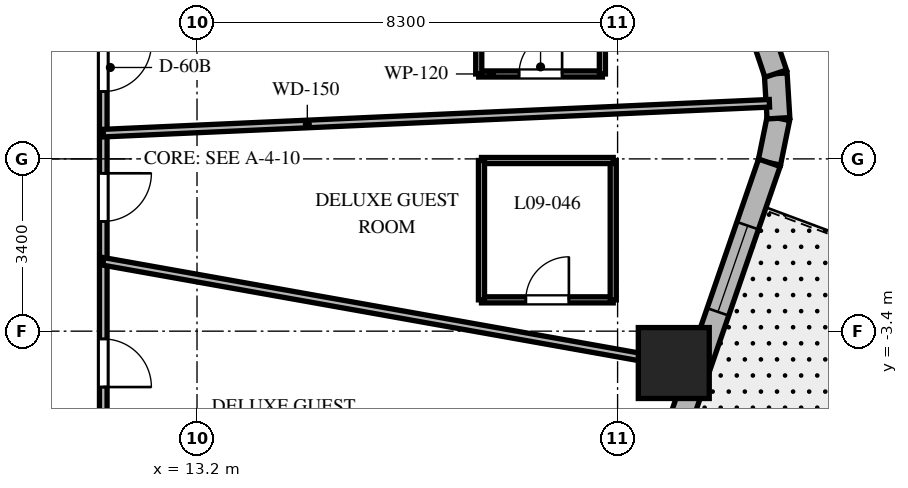
"""IFC4 building model, lengths in metres.
Left out: names, types, materials, properties, quantities, classifications, styles, units other than length and angle.
Written with IfcOpenShell. Run it as: python <this file> out.ifc"""

import sys

from ifc_helpers import new_model, si_unit, direction, frame, frame_2d, origin, origin_2d, place, context, subcontext, project, spatial, rectangle, extrude, element, fill, save


model = new_model("IFC4")
c1 = context("Model", 3, precision=1e-05, world=origin(), true_north=direction((0.0, 1.0)))
c2 = subcontext(c1, "Body", "Model", "MODEL_VIEW")
j1 = project(units=[si_unit("LENGTHUNIT", "METRE"), si_unit("PLANEANGLEUNIT", "RADIAN")], contexts=[c1])
p1 = place(None, origin())
s1 = spatial("IfcSite", under=j1, at=p1, CompositionType="ELEMENT")
p2 = place(p1, origin())
s2 = spatial("IfcBuilding", under=s1, at=p2, CompositionType="ELEMENT")
p3 = place(p2, frame((0.0, 0.0, 45.3)))
s3 = spatial("IfcBuildingStorey", under=s2, at=p3, CompositionType="ELEMENT", Elevation=45.3)
p4 = place(p3, frame((22.609, -4.029, 0.0), z_axis=(0.0, 0.0, 1.0), x_axis=(1.0, 0.0, 0.0)))
e1 = element("IfcColumn", 1, at=p4, inside=s3, PredefinedType="COLUMN", context=c2, shape_type="SweptSolid", body=[
    extrude(rectangle(XDim=1.4, YDim=1.4, at=origin_2d()), origin(), (0.0, 0.0, 1.0), 3.7),
])
p5 = place(p3, frame((24.496, -0.077, 0.0), z_axis=(0.0, 0.0, 1.0), x_axis=(0.199570594521, 0.979883451132, 0.0)))
e2 = element("IfcWall", 2, at=p5, inside=s3, PredefinedType="SOLIDWALL", context=c2, shape_type="SweptSolid", body=[
    extrude(rectangle(XDim=0.897, YDim=0.45, at=frame_2d((0.448, 0.0))), origin(), (0.0, 0.0, 1.0), 3.4),
])
p6 = place(p3, frame((24.675, 0.802, 0.0), z_axis=(0.0, 0.0, 1.0), x_axis=(-0.061188874166, 0.998126205286, 0.0)))
e3 = element("IfcWall", 3, at=p6, inside=s3, PredefinedType="SOLIDWALL", context=c2, shape_type="SweptSolid", body=[
    extrude(rectangle(XDim=0.882, YDim=0.45, at=frame_2d((0.441, 0.0))), origin(), (0.0, 0.0, 1.0), 3.4),
])
p7 = place(p3, frame((24.621, 1.682, 0.0), z_axis=(0.0, 0.0, 1.0), x_axis=(-0.317697451681, 0.948192137278, 0.0)))
e4 = element("IfcWall", 4, at=p7, inside=s3, PredefinedType="SOLIDWALL", context=c2, shape_type="SweptSolid", body=[
    extrude(rectangle(XDim=0.897, YDim=0.45, at=frame_2d((0.448, 0.0))), origin(), (0.0, 0.0, 1.0), 3.4),
])
p8 = place(p3, frame((17.39, -20.678, 0.0), z_axis=(0.0, 0.0, 1.0), x_axis=(0.326068018294, 0.945346310854, 0.0)))
e5 = element("IfcWall", 5, at=p8, inside=s3, PredefinedType="SOLIDWALL", context=c2, shape_type="SweptSolid", body=[
    extrude(rectangle(XDim=21.793, YDim=0.45, at=frame_2d((10.896, 0.0))), origin(), (0.0, 0.0, 1.0), 3.4),
])
p9 = place(p8, frame((5.493, 0.0, 0.0)))
e6 = element("IfcOpeningElement", 6, at=p9, cuts=e5, PredefinedType="OPENING", context=c2, shape_type="SweptSolid", body=[
    extrude(rectangle(XDim=0.95, YDim=2.15, at=frame_2d((0.475, 1.075))), frame((0.0, 0.235, 0.0), z_axis=(0.0, -1.0, 0.0), x_axis=(1.0, 0.0, 0.0)), (0.0, 0.0, 1.0), 0.47),
])
p10 = place(p8, frame((1.26, 0.0, 0.8)))
e7 = element("IfcOpeningElement", 7, at=p10, cuts=e5, PredefinedType="OPENING", context=c2, shape_type="SweptSolid", body=[
    extrude(rectangle(XDim=1.8, YDim=1.8, at=frame_2d((0.9, 0.9))), frame((0.0, 0.235, 0.0), z_axis=(0.0, -1.0, 0.0), x_axis=(1.0, 0.0, 0.0)), (0.0, 0.0, 1.0), 0.47),
])
p11 = place(p8, frame((7.283, 0.0, 0.8)))
e8 = element("IfcOpeningElement", 8, at=p11, cuts=e5, PredefinedType="OPENING", context=c2, shape_type="SweptSolid", body=[
    extrude(rectangle(XDim=1.8, YDim=1.8, at=frame_2d((0.9, 0.9))), frame((0.0, 0.235, 0.0), z_axis=(0.0, -1.0, 0.0), x_axis=(1.0, 0.0, 0.0)), (0.0, 0.0, 1.0), 0.47),
])
p12 = place(p8, frame((12.736, 0.0, 0.8)))
e9 = element("IfcOpeningElement", 9, at=p12, cuts=e5, PredefinedType="OPENING", context=c2, shape_type="SweptSolid", body=[
    extrude(rectangle(XDim=1.8, YDim=1.8, at=frame_2d((0.9, 0.9))), frame((0.0, 0.235, 0.0), z_axis=(0.0, -1.0, 0.0), x_axis=(1.0, 0.0, 0.0)), (0.0, 0.0, 1.0), 0.47),
])
p13 = place(p8, frame((18.68, 0.0, 0.8)))
e10 = element("IfcOpeningElement", 10, at=p13, cuts=e5, PredefinedType="OPENING", context=c2, shape_type="SweptSolid", body=[
    extrude(rectangle(XDim=1.8, YDim=1.8, at=frame_2d((0.9, 0.9))), frame((0.0, 0.235, 0.0), z_axis=(0.0, -1.0, 0.0), x_axis=(1.0, 0.0, 0.0)), (0.0, 0.0, 1.0), 0.47),
])
p14 = place(p3, frame((11.35, 9.85, 0.0), z_axis=(0.0, 0.0, 1.0), x_axis=(0.0, -1.0, 0.0)))
e11 = element("IfcWall", 11, at=p14, inside=s3, PredefinedType="PARTITIONING", context=c2, shape_type="SweptSolid", body=[
    extrude(rectangle(XDim=19.7, YDim=0.15, at=frame_2d((9.85, 0.0))), origin(), (0.0, 0.0, 1.0), 2.84),
])
p15 = place(p14, frame((7.571, 0.0, 0.0)))
e12 = element("IfcOpeningElement", 12, at=p15, cuts=e11, PredefinedType="OPENING", context=c2, shape_type="SweptSolid", body=[
    extrude(rectangle(XDim=0.95, YDim=2.03, at=frame_2d((0.475, 1.015))), frame((0.0, 0.085, 0.0), z_axis=(0.0, -1.0, 0.0), x_axis=(1.0, 0.0, 0.0)), (0.0, 0.0, 1.0), 0.17),
])
p16 = place(p14, frame((3.024, 0.0, 0.0)))
e13 = element("IfcOpeningElement", 13, at=p16, cuts=e11, PredefinedType="OPENING", context=c2, shape_type="SweptSolid", body=[
    extrude(rectangle(XDim=0.95, YDim=2.03, at=frame_2d((0.475, 1.015))), frame((0.0, 0.085, 0.0), z_axis=(0.0, -1.0, 0.0), x_axis=(1.0, 0.0, 0.0)), (0.0, 0.0, 1.0), 0.17),
])
p17 = place(p14, frame((17.181, 0.0, 0.0)))
e14 = element("IfcOpeningElement", 14, at=p17, cuts=e11, PredefinedType="OPENING", context=c2, shape_type="SweptSolid", body=[
    extrude(rectangle(XDim=0.95, YDim=2.03, at=frame_2d((0.475, 1.015))), frame((0.0, 0.085, 0.0), z_axis=(0.0, -1.0, 0.0), x_axis=(1.0, 0.0, 0.0)), (0.0, 0.0, 1.0), 0.17),
])
p18 = place(p14, frame((13.403, 0.0, 0.0)))
e15 = element("IfcOpeningElement", 15, at=p18, cuts=e11, PredefinedType="OPENING", context=c2, shape_type="SweptSolid", body=[
    extrude(rectangle(XDim=0.95, YDim=2.03, at=frame_2d((0.475, 1.015))), frame((0.0, 0.085, 0.0), z_axis=(0.0, -1.0, 0.0), x_axis=(1.0, 0.0, 0.0)), (0.0, 0.0, 1.0), 0.17),
])
p19 = place(p14, frame((10.134, 0.0, 0.0)))
e16 = element("IfcOpeningElement", 16, at=p19, cuts=e11, PredefinedType="OPENING", context=c2, shape_type="SweptSolid", body=[
    extrude(rectangle(XDim=0.95, YDim=2.03, at=frame_2d((0.475, 1.015))), frame((0.0, 0.085, 0.0), z_axis=(0.0, -1.0, 0.0), x_axis=(1.0, 0.0, 0.0)), (0.0, 0.0, 1.0), 0.17),
])
p20 = place(p3, frame((11.35, 0.508, 0.0), z_axis=(0.0, 0.0, 1.0), x_axis=(0.998998237556, 0.044749540337, 0.0)))
e17 = element("IfcWall", 17, at=p20, inside=s3, PredefinedType="PARTITIONING", context=c2, shape_type="SweptSolid", body=[
    extrude(rectangle(XDim=13.159, YDim=0.15, at=frame_2d((6.58, 0.0))), origin(), (0.0, 0.0, 1.0), 2.54),
])
p21 = place(p3, frame((11.35, -2.023, 0.0), z_axis=(0.0, 0.0, 1.0), x_axis=(0.984493741877, -0.17541970301, 0.0)))
e18 = element("IfcWall", 18, at=p21, inside=s3, PredefinedType="PARTITIONING", context=c2, shape_type="SweptSolid", body=[
    extrude(rectangle(XDim=11.937, YDim=0.15, at=frame_2d((5.969, 0.0))), origin(), (0.0, 0.0, 1.0), 2.54),
])
p22 = place(p3, frame((18.76, 1.676, 0.0), z_axis=(0.0, 0.0, 1.0), x_axis=(1.0, 0.0, 0.0)))
e19 = element("IfcWall", 19, at=p22, inside=s3, PredefinedType="PARTITIONING", context=c2, shape_type="SweptSolid", body=[
    extrude(rectangle(XDim=2.44, YDim=0.12, at=frame_2d((1.22, 0.0))), origin(), (0.0, 0.0, 1.0), 3.4),
])
p23 = place(p22, frame((0.795, 0.0, 0.0)))
e20 = element("IfcOpeningElement", 20, at=p23, cuts=e19, PredefinedType="OPENING", context=c2, shape_type="SweptSolid", body=[
    extrude(rectangle(XDim=0.85, YDim=2.03, at=frame_2d((0.425, 1.015))), frame((0.0, 0.07, 0.0), z_axis=(0.0, -1.0, 0.0), x_axis=(1.0, 0.0, 0.0)), (0.0, 0.0, 1.0), 0.14),
])
for number, where, z_axis, x_axis in (
    (21, (21.2, 1.676, 0.0), (0.0, 0.0, 1.0), (0.0, 1.0, 0.0)),
    (22, (18.76, 4.286, 0.0), (0.0, 0.0, 1.0), (0.0, -1.0, 0.0)),
):
    element("IfcWall", number, at=place(p3, frame(where, z_axis=z_axis, x_axis=x_axis)), inside=s3, PredefinedType="PARTITIONING", context=c2, shape_type="SweptSolid", body=[
        extrude(rectangle(XDim=2.61, YDim=0.12, at=frame_2d((1.305, 0.0))), origin(), (0.0, 0.0, 1.0), 3.4),
    ])
p24 = place(p3, frame((18.814, -2.782, 0.0), z_axis=(0.0, 0.0, 1.0), x_axis=(1.0, 0.0, 0.0)))
e23 = element("IfcWall", 23, at=p24, inside=s3, PredefinedType="PARTITIONING", context=c2, shape_type="SweptSolid", body=[
    extrude(rectangle(XDim=2.6, YDim=0.12, at=frame_2d((1.3, 0.0))), origin(), (0.0, 0.0, 1.0), 3.4),
])
p25 = place(p24, frame((0.875, 0.0, 0.0)))
e24 = element("IfcOpeningElement", 24, at=p25, cuts=e23, PredefinedType="OPENING", context=c2, shape_type="SweptSolid", body=[
    extrude(rectangle(XDim=0.85, YDim=2.03, at=frame_2d((0.425, 1.015))), frame((0.0, 0.07, 0.0), z_axis=(0.0, -1.0, 0.0), x_axis=(1.0, 0.0, 0.0)), (0.0, 0.0, 1.0), 0.14),
])
p26 = place(p3, frame((21.414, -2.782, 0.0), z_axis=(0.0, 0.0, 1.0), x_axis=(0.0, 1.0, 0.0)))
e25 = element("IfcWall", 25, at=p26, inside=s3, PredefinedType="PARTITIONING", context=c2, shape_type="SweptSolid", body=[
    extrude(rectangle(XDim=2.75, YDim=0.12, at=frame_2d((1.375, 0.0))), origin(), (0.0, 0.0, 1.0), 3.4),
])
p27 = place(p3, frame((21.414, -0.032, 0.0), z_axis=(0.0, 0.0, 1.0), x_axis=(-1.0, 0.0, 0.0)))
e26 = element("IfcWall", 26, at=p27, inside=s3, PredefinedType="PARTITIONING", context=c2, shape_type="SweptSolid", body=[
    extrude(rectangle(XDim=2.6, YDim=0.12, at=frame_2d((1.3, 0.0))), origin(), (0.0, 0.0, 1.0), 3.4),
])
p28 = place(p3, frame((18.814, -0.032, 0.0), z_axis=(0.0, 0.0, 1.0), x_axis=(0.0, -1.0, 0.0)))
e27 = element("IfcWall", 27, at=p28, inside=s3, PredefinedType="PARTITIONING", context=c2, shape_type="SweptSolid", body=[
    extrude(rectangle(XDim=2.75, YDim=0.12, at=frame_2d((1.375, 0.0))), origin(), (0.0, 0.0, 1.0), 3.4),
])
p29 = place(p13, origin())
e28 = element("IfcWindow", 28, at=p29, inside=s3, PartitioningType="SINGLE_PANEL", PredefinedType="WINDOW", context=c2, shape_type="SweptSolid", body=[
    extrude(rectangle(XDim=1.8, YDim=1.8, at=frame_2d((0.9, 0.9))), frame((0.0, 0.03, 0.0), z_axis=(0.0, -1.0, 0.0), x_axis=(1.0, 0.0, 0.0)), (0.0, 0.0, 1.0), 0.06),
])
fill(e10, e28)
p30 = place(p15, origin())
e29 = element("IfcDoor", 29, at=p30, inside=s3, OperationType="SINGLE_SWING_LEFT", PredefinedType="DOOR", context=c2, shape_type="SweptSolid", body=[
    extrude(rectangle(XDim=0.95, YDim=2.03, at=frame_2d((0.475, 1.015))), frame((0.0, 0.025, 0.0), z_axis=(0.0, -1.0, 0.0), x_axis=(1.0, 0.0, 0.0)), (0.0, 0.0, 1.0), 0.05),
])
fill(e12, e29)
p31 = place(p23, origin())
e30 = element("IfcDoor", 30, at=p31, inside=s3, OperationType="SINGLE_SWING_RIGHT", PredefinedType="DOOR", context=c2, shape_type="SweptSolid", body=[
    extrude(rectangle(XDim=0.85, YDim=2.03, at=frame_2d((0.425, 1.015))), frame((0.0, 0.025, 0.0), z_axis=(0.0, -1.0, 0.0), x_axis=(1.0, 0.0, 0.0)), (0.0, 0.0, 1.0), 0.05),
])
fill(e20, e30)
p32 = place(p18, origin())
e31 = element("IfcDoor", 31, at=p32, inside=s3, OperationType="SINGLE_SWING_RIGHT", PredefinedType="DOOR", context=c2, shape_type="SweptSolid", body=[
    extrude(rectangle(XDim=0.95, YDim=2.03, at=frame_2d((0.475, 1.015))), frame((0.0, 0.025, 0.0), z_axis=(0.0, -1.0, 0.0), x_axis=(1.0, 0.0, 0.0)), (0.0, 0.0, 1.0), 0.05),
])
fill(e15, e31)
p33 = place(p19, origin())
e32 = element("IfcDoor", 32, at=p33, inside=s3, OperationType="SINGLE_SWING_LEFT", PredefinedType="DOOR", context=c2, shape_type="SweptSolid", body=[
    extrude(rectangle(XDim=0.95, YDim=2.03, at=frame_2d((0.475, 1.015))), frame((0.0, 0.025, 0.0), z_axis=(0.0, -1.0, 0.0), x_axis=(1.0, 0.0, 0.0)), (0.0, 0.0, 1.0), 0.05),
])
fill(e16, e32)
p34 = place(p25, origin())
e33 = element("IfcDoor", 33, at=p34, inside=s3, OperationType="SINGLE_SWING_RIGHT", PredefinedType="DOOR", context=c2, shape_type="SweptSolid", body=[
    extrude(rectangle(XDim=0.85, YDim=2.03, at=frame_2d((0.425, 1.015))), frame((0.0, 0.025, 0.0), z_axis=(0.0, -1.0, 0.0), x_axis=(1.0, 0.0, 0.0)), (0.0, 0.0, 1.0), 0.05),
])
fill(e24, e33)
save(model, sys.argv[1])
